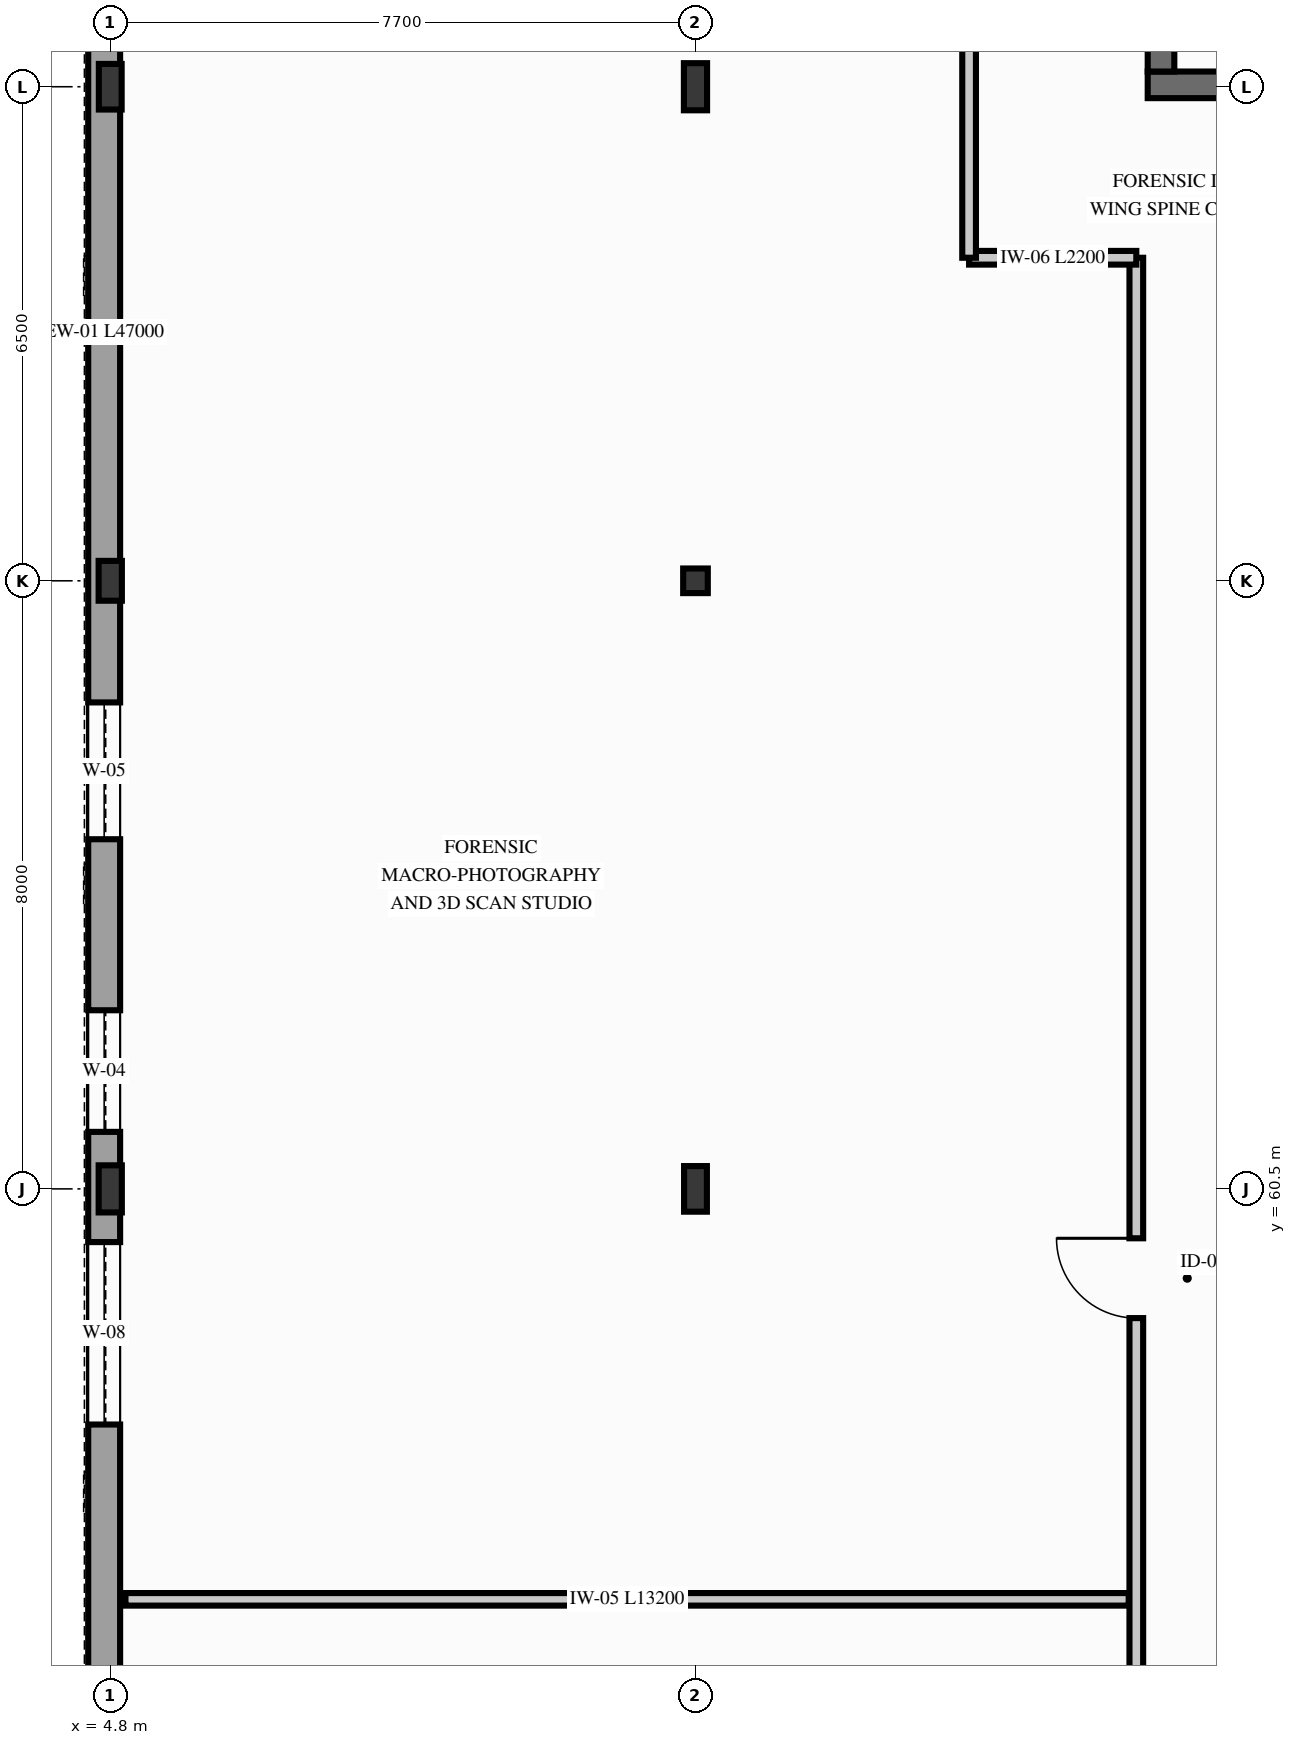
"""IFC4 building model, lengths in metres.
Left out: names, types, materials, properties, quantities, classifications, styles, units other than length and angle.
Written with IfcOpenShell. Run it as: python <this file> out.ifc"""

import sys

from ifc_helpers import new_model, si_unit, direction, frame, frame_2d, origin, origin_2d, place, context, subcontext, project, spatial, rectangle, hollow_circle, i_section, extrude, element, fill, save


model = new_model("IFC4")
c1 = context("Model", 3, precision=1e-05, world=origin(), true_north=direction((0.0, 1.0)))
c2 = subcontext(c1, "Body", "Model", "MODEL_VIEW")
j1 = project(units=[si_unit("LENGTHUNIT", "METRE"), si_unit("PLANEANGLEUNIT", "RADIAN")], contexts=[c1])
p1 = place(None, origin())
s1 = spatial("IfcSite", under=j1, at=p1, CompositionType="ELEMENT")
p2 = place(p1, origin())
s2 = spatial("IfcBuilding", under=s1, at=p2, CompositionType="ELEMENT")
p3 = place(p2, frame((0.0, 0.0, 5.1)))
s3 = spatial("IfcBuildingStorey", under=s2, at=p3, CompositionType="ELEMENT", Elevation=5.1)
p4 = place(p3, frame((18.45, 75.025, 0.0), z_axis=(0.0, 0.0, 1.0), x_axis=(1.0, 0.0, 0.0)))
e1 = element("IfcWall", 1, at=p4, inside=s3, PredefinedType="SHEAR", context=c2, shape_type="SweptSolid", body=[
    extrude(rectangle(XDim=8.3, YDim=0.35, at=frame_2d((4.15, 0.0))), origin(), (0.0, 0.0, 1.0), 3.98),
])
p5 = place(p3, frame((18.625, 75.2, 0.0), z_axis=(0.0, 0.0, 1.0), x_axis=(0.0, 1.0, 0.0)))
e2 = element("IfcWall", 2, at=p5, inside=s3, PredefinedType="SHEAR", context=c2, shape_type="SweptSolid", body=[
    extrude(rectangle(XDim=6.8, YDim=0.35, at=frame_2d((3.4, 0.0))), origin(), (0.0, 0.0, 1.0), 3.98),
])
p6 = place(p5, frame((2.6, 0.0, 0.0)))
e3 = element("IfcOpeningElement", 3, at=p6, cuts=e2, PredefinedType="OPENING", context=c2, shape_type="SweptSolid", body=[
    extrude(rectangle(XDim=1.25, YDim=2.2, at=frame_2d((0.625, 1.1))), frame((0.0, 0.185, 0.0), z_axis=(0.0, -1.0, 0.0), x_axis=(1.0, 0.0, 0.0)), (0.0, 0.0, 1.0), 0.37),
])
p7 = place(p3, frame((4.8, 60.5, 0.0), z_axis=(0.0, 0.0, 1.0), x_axis=(1.0, 0.0, 0.0)))
e4 = element("IfcColumn", 4, at=p7, inside=s3, PredefinedType="COLUMN", context=c2, shape_type="SweptSolid", body=[
    extrude(i_section(OverallWidth=0.305, OverallDepth=0.62, WebThickness=0.021, FlangeThickness=0.04, FilletRadius=0.027, at=origin_2d()), origin(), (0.0, 0.0, 1.0), 4.2),
])
p8 = place(p3, frame((4.8, 68.5, 0.0), z_axis=(0.0, 0.0, 1.0), x_axis=(1.0, 0.0, 0.0)))
e5 = element("IfcColumn", 5, at=p8, inside=s3, PredefinedType="COLUMN", context=c2, shape_type="SweptSolid", body=[
    extrude(i_section(OverallWidth=0.306, OverallDepth=0.524, WebThickness=0.021, FlangeThickness=0.04, FilletRadius=0.027, at=origin_2d()), origin(), (0.0, 0.0, 1.0), 4.2),
])
for number, where, z_axis, x_axis in (
    (6, (4.8, 75.0, 0.0), (0.0, 0.0, 1.0), (1.0, 0.0, 0.0)),
    (7, (12.5, 60.5, 0.0), (0.0, 0.0, 1.0), (1.0, 0.0, 0.0)),
):
    element("IfcColumn", number, at=place(p3, frame(where, z_axis=z_axis, x_axis=x_axis)), inside=s3, PredefinedType="COLUMN", context=c2, shape_type="SweptSolid", body=[
        extrude(i_section(OverallWidth=0.3, OverallDepth=0.6, WebThickness=0.015, FlangeThickness=0.03, FilletRadius=0.027, at=origin_2d()), origin(), (0.0, 0.0, 1.0), 4.2),
    ])
p9 = place(p3, frame((12.5, 68.5, 0.0), z_axis=(0.0, 0.0, 1.0), x_axis=(1.0, 0.0, 0.0)))
e8 = element("IfcColumn", 8, at=p9, inside=s3, PredefinedType="COLUMN", context=c2, shape_type="SweptSolid", body=[
    extrude(hollow_circle(Radius=0.162, WallThickness=0.016, at=origin_2d()), origin(), (0.0, 0.0, 1.0), 4.2),
])
p10 = place(p3, frame((12.5, 75.0, 0.0), z_axis=(0.0, 0.0, 1.0), x_axis=(1.0, 0.0, 0.0)))
e9 = element("IfcColumn", 9, at=p10, inside=s3, PredefinedType="COLUMN", context=c2, shape_type="SweptSolid", body=[
    extrude(i_section(OverallWidth=0.305, OverallDepth=0.62, WebThickness=0.021, FlangeThickness=0.04, FilletRadius=0.027, at=origin_2d()), origin(), (0.0, 0.0, 1.0), 4.2),
])
p11 = place(p3, frame((4.72, 36.5, 0.0), z_axis=(0.0, 0.0, 1.0), x_axis=(0.0, 1.0, 0.0)))
e10 = element("IfcWall", 10, at=p11, inside=s3, PredefinedType="SOLIDWALL", context=c2, shape_type="SweptSolid", body=[
    extrude(rectangle(XDim=47.0, YDim=0.42, at=frame_2d((23.5, 0.0))), origin(), (0.0, 0.0, 1.0), 3.66),
])
p12 = place(p11, frame((1.65, 0.0, 0.74)))
e11 = element("IfcOpeningElement", 11, at=p12, cuts=e10, PredefinedType="OPENING", context=c2, shape_type="SweptSolid", body=[
    extrude(rectangle(XDim=1.6, YDim=2.4, at=frame_2d((0.8, 1.2))), frame((0.0, 0.22, 0.0), z_axis=(0.0, -1.0, 0.0), x_axis=(1.0, 0.0, 0.0)), (0.0, 0.0, 1.0), 0.44),
])
p13 = place(p11, frame((5.5, 0.0, 0.74)))
e12 = element("IfcOpeningElement", 12, at=p13, cuts=e10, PredefinedType="OPENING", context=c2, shape_type="SweptSolid", body=[
    extrude(rectangle(XDim=1.8, YDim=2.4, at=frame_2d((0.9, 1.2))), frame((0.0, 0.22, 0.0), z_axis=(0.0, -1.0, 0.0), x_axis=(1.0, 0.0, 0.0)), (0.0, 0.0, 1.0), 0.44),
])
p14 = place(p11, frame((9.35, 0.0, 0.84)))
e13 = element("IfcOpeningElement", 13, at=p14, cuts=e10, PredefinedType="OPENING", context=c2, shape_type="SweptSolid", body=[
    extrude(rectangle(XDim=1.5, YDim=2.3, at=frame_2d((0.75, 1.15))), frame((0.0, 0.22, 0.0), z_axis=(0.0, -1.0, 0.0), x_axis=(1.0, 0.0, 0.0)), (0.0, 0.0, 1.0), 0.44),
])
p15 = place(p11, frame((13.2, 0.0, 0.85)))
e14 = element("IfcOpeningElement", 14, at=p15, cuts=e10, PredefinedType="OPENING", context=c2, shape_type="SweptSolid", body=[
    extrude(rectangle(XDim=1.4, YDim=2.2, at=frame_2d((0.7, 1.1))), frame((0.0, 0.22, 0.0), z_axis=(0.0, -1.0, 0.0), x_axis=(1.0, 0.0, 0.0)), (0.0, 0.0, 1.0), 0.44),
])
p16 = place(p11, frame((20.9, 0.0, 0.74)))
e15 = element("IfcOpeningElement", 15, at=p16, cuts=e10, PredefinedType="OPENING", context=c2, shape_type="SweptSolid", body=[
    extrude(rectangle(XDim=2.4, YDim=2.4, at=frame_2d((1.2, 1.2))), frame((0.0, 0.22, 0.0), z_axis=(0.0, -1.0, 0.0), x_axis=(1.0, 0.0, 0.0)), (0.0, 0.0, 1.0), 0.44),
])
p17 = place(p11, frame((24.75, 0.0, 0.74)))
e16 = element("IfcOpeningElement", 16, at=p17, cuts=e10, PredefinedType="OPENING", context=c2, shape_type="SweptSolid", body=[
    extrude(rectangle(XDim=1.6, YDim=2.4, at=frame_2d((0.8, 1.2))), frame((0.0, 0.22, 0.0), z_axis=(0.0, -1.0, 0.0), x_axis=(1.0, 0.0, 0.0)), (0.0, 0.0, 1.0), 0.44),
])
p18 = place(p11, frame((28.6, 0.0, 0.74)))
e17 = element("IfcOpeningElement", 17, at=p18, cuts=e10, PredefinedType="OPENING", context=c2, shape_type="SweptSolid", body=[
    extrude(rectangle(XDim=1.8, YDim=2.4, at=frame_2d((0.9, 1.2))), frame((0.0, 0.22, 0.0), z_axis=(0.0, -1.0, 0.0), x_axis=(1.0, 0.0, 0.0)), (0.0, 0.0, 1.0), 0.44),
])
p19 = place(p11, frame((40.15, 0.0, 0.54)))
e18 = element("IfcOpeningElement", 18, at=p19, cuts=e10, PredefinedType="OPENING", context=c2, shape_type="SweptSolid", body=[
    extrude(rectangle(XDim=2.2, YDim=2.6, at=frame_2d((1.1, 1.3))), frame((0.0, 0.22, 0.0), z_axis=(0.0, -1.0, 0.0), x_axis=(1.0, 0.0, 0.0)), (0.0, 0.0, 1.0), 0.44),
])
p20 = place(p3, frame((18.3, 36.8, 0.0), z_axis=(0.0, 0.0, 1.0), x_axis=(0.0, 1.0, 0.0)))
e19 = element("IfcWall", 19, at=p20, inside=s3, PredefinedType="PARTITIONING", context=c2, shape_type="SweptSolid", body=[
    extrude(rectangle(XDim=35.95, YDim=0.18, at=frame_2d((17.975, 0.0))), origin(), (0.0, 0.0, 1.0), 3.658),
])
p21 = place(p20, frame((7.0, 0.0, 0.0)))
e20 = element("IfcOpeningElement", 20, at=p21, cuts=e19, PredefinedType="OPENING", context=c2, shape_type="SweptSolid", body=[
    extrude(rectangle(XDim=1.02, YDim=2.18, at=frame_2d((0.51, 1.09))), frame((0.0, 0.1, 0.0), z_axis=(0.0, -1.0, 0.0), x_axis=(1.0, 0.0, 0.0)), (0.0, 0.0, 1.0), 0.2),
])
p22 = place(p20, frame((22.0, 0.0, 0.0)))
e21 = element("IfcOpeningElement", 21, at=p22, cuts=e19, PredefinedType="OPENING", context=c2, shape_type="SweptSolid", body=[
    extrude(rectangle(XDim=1.05, YDim=2.2, at=frame_2d((0.525, 1.1))), frame((0.0, 0.1, 0.0), z_axis=(0.0, -1.0, 0.0), x_axis=(1.0, 0.0, 0.0)), (0.0, 0.0, 1.0), 0.2),
])
p23 = place(p3, frame((16.1, 72.75, 0.0), z_axis=(0.0, 0.0, 1.0), x_axis=(1.0, 0.0, 0.0)))
e22 = element("IfcWall", 22, at=p23, inside=s3, PredefinedType="PARTITIONING", context=c2, shape_type="SweptSolid", body=[
    extrude(rectangle(XDim=2.2, YDim=0.18, at=frame_2d((1.1, 0.0))), origin(), (0.0, 0.0, 1.0), 3.67),
])
p24 = place(p3, frame((16.1, 72.75, 0.0), z_axis=(0.0, 0.0, 1.0), x_axis=(0.0, 1.0, 0.0)))
e23 = element("IfcWall", 23, at=p24, inside=s3, PredefinedType="PARTITIONING", context=c2, shape_type="SweptSolid", body=[
    extrude(rectangle(XDim=11.1, YDim=0.18, at=frame_2d((5.55, 0.0))), origin(), (0.0, 0.0, 1.0), 3.658),
])
p25 = place(p24, frame((4.5, 0.0, 0.0)))
e24 = element("IfcOpeningElement", 24, at=p25, cuts=e23, PredefinedType="OPENING", context=c2, shape_type="SweptSolid", body=[
    extrude(rectangle(XDim=1.05, YDim=2.2, at=frame_2d((0.525, 1.1))), frame((0.0, 0.1, 0.0), z_axis=(0.0, -1.0, 0.0), x_axis=(1.0, 0.0, 0.0)), (0.0, 0.0, 1.0), 0.2),
])
p26 = place(p3, frame((5.0, 55.1, 0.0), z_axis=(0.0, 0.0, 1.0), x_axis=(1.0, 0.0, 0.0)))
e25 = element("IfcWall", 25, at=p26, inside=s3, PredefinedType="PARTITIONING", context=c2, shape_type="SweptSolid", body=[
    extrude(rectangle(XDim=13.2, YDim=0.165, at=frame_2d((6.6, 0.0))), origin(), (0.0, 0.0, 1.0), 3.528),
])
p27 = place(p16, origin())
e26 = element("IfcWindow", 26, at=p27, inside=s3, PartitioningType="SINGLE_PANEL", PredefinedType="WINDOW", context=c2, shape_type="SweptSolid", body=[
    extrude(rectangle(XDim=2.4, YDim=2.4, at=frame_2d((1.2, 1.2))), frame((0.0, 0.03, 0.0), z_axis=(0.0, -1.0, 0.0), x_axis=(1.0, 0.0, 0.0)), (0.0, 0.0, 1.0), 0.06),
])
fill(e15, e26)
p28 = place(p17, origin())
e27 = element("IfcWindow", 27, at=p28, inside=s3, PartitioningType="SINGLE_PANEL", PredefinedType="WINDOW", context=c2, shape_type="SweptSolid", body=[
    extrude(rectangle(XDim=1.6, YDim=2.4, at=frame_2d((0.8, 1.2))), frame((0.0, 0.03, 0.0), z_axis=(0.0, -1.0, 0.0), x_axis=(1.0, 0.0, 0.0)), (0.0, 0.0, 1.0), 0.06),
])
fill(e16, e27)
p29 = place(p18, origin())
e28 = element("IfcWindow", 28, at=p29, inside=s3, PartitioningType="SINGLE_PANEL", PredefinedType="WINDOW", context=c2, shape_type="SweptSolid", body=[
    extrude(rectangle(XDim=1.8, YDim=2.4, at=frame_2d((0.9, 1.2))), frame((0.0, 0.03, 0.0), z_axis=(0.0, -1.0, 0.0), x_axis=(1.0, 0.0, 0.0)), (0.0, 0.0, 1.0), 0.06),
])
fill(e17, e28)
p30 = place(p22, origin())
e29 = element("IfcDoor", 29, at=p30, inside=s3, OperationType="SINGLE_SWING_RIGHT", PredefinedType="DOOR", context=c2, shape_type="SweptSolid", body=[
    extrude(rectangle(XDim=1.05, YDim=2.2, at=frame_2d((0.525, 1.1))), frame((0.0, 0.025, 0.0), z_axis=(0.0, -1.0, 0.0), x_axis=(1.0, 0.0, 0.0)), (0.0, 0.0, 1.0), 0.05),
])
fill(e21, e29)
save(model, sys.argv[1])
